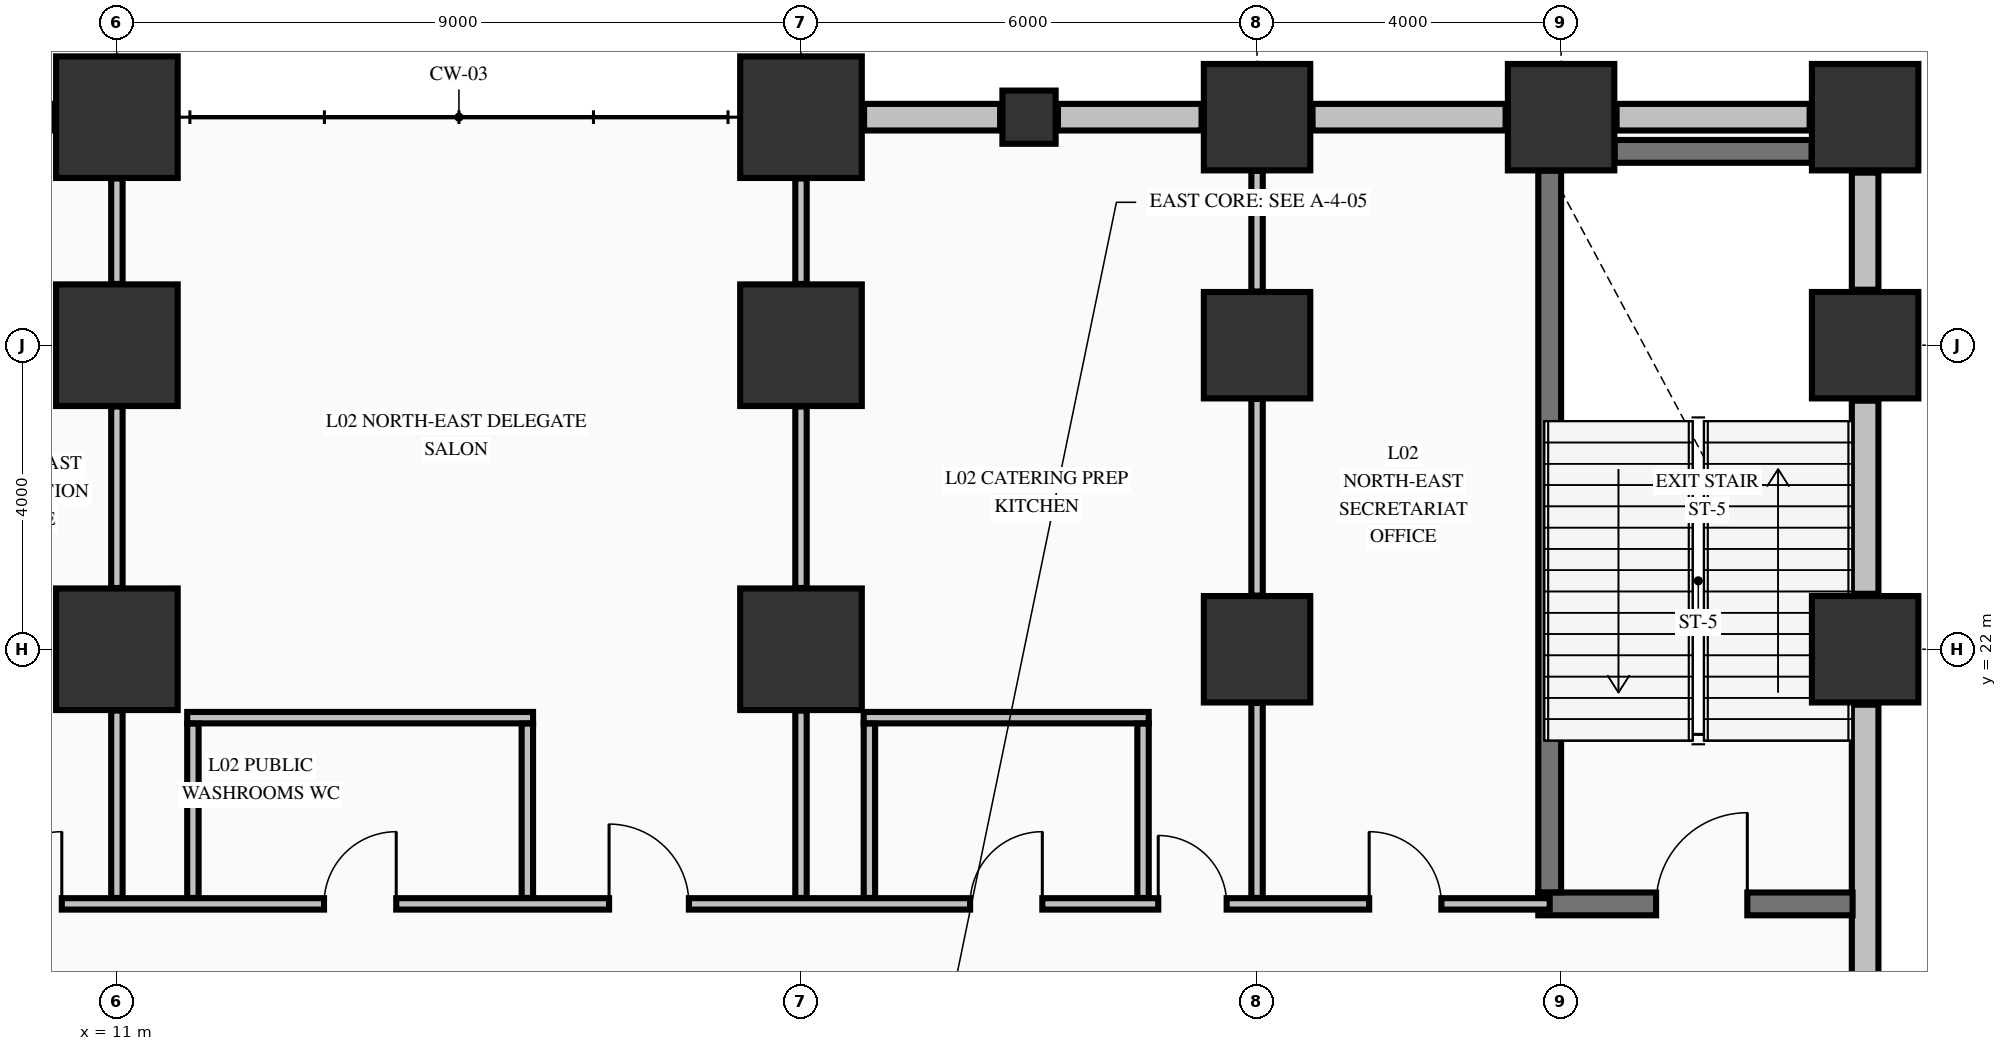
"""IFC4 building model, lengths in metres.
Left out: names, types, materials, properties, quantities, classifications, styles, units other than length and angle.
Written with IfcOpenShell. Run it as: python <this file> out.ifc"""

import sys

from ifc_helpers import new_model, si_unit, direction, frame, frame_2d, origin, origin_2d, place, context, subcontext, project, spatial, rectangle, extrude, element, fill, save


model = new_model("IFC4")
c1 = context("Model", 3, precision=1e-05, world=origin(), true_north=direction((0.0, 1.0)))
c2 = subcontext(c1, "Body", "Model", "MODEL_VIEW")
j1 = project(units=[si_unit("LENGTHUNIT", "METRE"), si_unit("PLANEANGLEUNIT", "RADIAN")], contexts=[c1])
p1 = place(None, origin())
s1 = spatial("IfcSite", under=j1, at=p1, CompositionType="ELEMENT")
p2 = place(p1, origin())
s2 = spatial("IfcBuilding", under=s1, at=p2, CompositionType="ELEMENT")
p3 = place(p2, frame((0.0, 0.0, 10.88)))
s3 = spatial("IfcBuildingStorey", under=s2, at=p3, CompositionType="ELEMENT", Elevation=10.88)
for number, where, z_axis, x_axis in (
    (1, (11.0, 22.0, 0.0), (0.0, 0.0, 1.0), (1.0, 0.0, 0.0)),
    (2, (11.0, 26.0, 0.0), (0.0, 0.0, 1.0), (1.0, 0.0, 0.0)),
    (3, (11.0, 29.0, 0.0), (0.0, 0.0, 1.0), (1.0, 0.0, 0.0)),
    (4, (20.0, 22.0, 0.0), (0.0, 0.0, 1.0), (1.0, 0.0, 0.0)),
    (5, (20.0, 26.0, 0.0), (0.0, 0.0, 1.0), (1.0, 0.0, 0.0)),
    (6, (20.0, 29.0, 0.0), (0.0, 0.0, 1.0), (1.0, 0.0, 0.0)),
):
    element("IfcColumn", number, at=place(p3, frame(where, z_axis=z_axis, x_axis=x_axis)), inside=s3, PredefinedType="COLUMN", context=c2, shape_type="SweptSolid", body=[
        extrude(rectangle(XDim=1.6, YDim=1.6, at=origin_2d()), origin(), (0.0, 0.0, 1.0), 5.09),
    ])
for number, where, z_axis, x_axis in (
    (7, (26.0, 22.0, 0.0), (0.0, 0.0, 1.0), (1.0, 0.0, 0.0)),
    (8, (26.0, 26.0, 0.0), (0.0, 0.0, 1.0), (1.0, 0.0, 0.0)),
    (9, (26.0, 29.0, 0.0), (0.0, 0.0, 1.0), (1.0, 0.0, 0.0)),
    (10, (30.0, 29.0, 0.0), (0.0, 0.0, 1.0), (1.0, 0.0, 0.0)),
    (11, (34.0, 22.0, 0.0), (0.0, 0.0, 1.0), (1.0, 0.0, 0.0)),
    (12, (34.0, 26.0, 0.0), (0.0, 0.0, 1.0), (1.0, 0.0, 0.0)),
    (13, (34.0, 29.0, 0.0), (0.0, 0.0, 1.0), (1.0, 0.0, 0.0)),
):
    element("IfcColumn", number, at=place(p3, frame(where, z_axis=z_axis, x_axis=x_axis)), inside=s3, PredefinedType="COLUMN", context=c2, shape_type="SweptSolid", body=[
        extrude(rectangle(XDim=1.4, YDim=1.4, at=origin_2d()), origin(), (0.0, 0.0, 1.0), 5.09),
    ])
p4 = place(p3, frame((23.0, 29.0, 0.0), z_axis=(0.0, 0.0, 1.0), x_axis=(1.0, 0.0, 0.0)))
e14 = element("IfcColumn", 14, at=p4, inside=s3, PredefinedType="PILASTER", context=c2, shape_type="SweptSolid", body=[
    extrude(rectangle(XDim=0.7, YDim=0.7, at=origin_2d()), origin(), (0.0, 0.0, 1.0), 5.09),
])
p5 = place(p3, frame((10.17, 29.0, 0.0), z_axis=(0.0, 0.0, 1.0), x_axis=(-1.0, 0.0, 0.0)))
e15 = element("IfcWall", 15, at=p5, inside=s3, PredefinedType="STANDARD", context=c2, shape_type="SweptSolid", body=[
    extrude(rectangle(XDim=0.94, YDim=0.35, at=frame_2d((0.47, 0.0))), origin(), (0.0, 0.0, 1.0), 4.482),
])
p6 = place(p3, frame((22.62, 29.0, 0.0), z_axis=(0.0, 0.0, 1.0), x_axis=(-1.0, 0.0, 0.0)))
e16 = element("IfcWall", 16, at=p6, inside=s3, PredefinedType="STANDARD", context=c2, shape_type="SweptSolid", body=[
    extrude(rectangle(XDim=1.79, YDim=0.35, at=frame_2d((0.895, 0.0))), origin(), (0.0, 0.0, 1.0), 4.482),
])
p7 = place(p3, frame((25.27, 29.0, 0.0), z_axis=(0.0, 0.0, 1.0), x_axis=(-1.0, 0.0, 0.0)))
e17 = element("IfcWall", 17, at=p7, inside=s3, PredefinedType="STANDARD", context=c2, shape_type="SweptSolid", body=[
    extrude(rectangle(XDim=1.89, YDim=0.35, at=frame_2d((0.945, 0.0))), origin(), (0.0, 0.0, 1.0), 4.482),
])
for number, where, z_axis, x_axis in (
    (18, (29.27, 29.0, 0.0), (0.0, 0.0, 1.0), (-1.0, 0.0, 0.0)),
    (19, (33.27, 29.0, 0.0), (0.0, 0.0, 1.0), (-1.0, 0.0, 0.0)),
):
    element("IfcWall", number, at=place(p3, frame(where, z_axis=z_axis, x_axis=x_axis)), inside=s3, PredefinedType="STANDARD", context=c2, shape_type="SweptSolid", body=[
        extrude(rectangle(XDim=2.54, YDim=0.35, at=frame_2d((1.27, 0.0))), origin(), (0.0, 0.0, 1.0), 4.482),
    ])
p8 = place(p3, frame((34.0, 21.27, 0.0), z_axis=(0.0, 0.0, 1.0), x_axis=(0.0, -1.0, 0.0)))
e20 = element("IfcWall", 20, at=p8, inside=s3, PredefinedType="STANDARD", context=c2, shape_type="SweptSolid", body=[
    extrude(rectangle(XDim=4.54, YDim=0.35, at=frame_2d((2.27, 0.0))), origin(), (0.0, 0.0, 1.0), 5.09),
])
p9 = place(p3, frame((34.0, 25.27, 0.0), z_axis=(0.0, 0.0, 1.0), x_axis=(0.0, -1.0, 0.0)))
e21 = element("IfcWall", 21, at=p9, inside=s3, PredefinedType="STANDARD", context=c2, shape_type="SweptSolid", body=[
    extrude(rectangle(XDim=2.54, YDim=0.35, at=frame_2d((1.27, 0.0))), origin(), (0.0, 0.0, 1.0), 5.09),
])
p10 = place(p3, frame((34.0, 28.27, 0.0), z_axis=(0.0, 0.0, 1.0), x_axis=(0.0, -1.0, 0.0)))
e22 = element("IfcWall", 22, at=p10, inside=s3, PredefinedType="STANDARD", context=c2, shape_type="SweptSolid", body=[
    extrude(rectangle(XDim=1.54, YDim=0.35, at=frame_2d((0.77, 0.0))), origin(), (0.0, 0.0, 1.0), 5.09),
])
p11 = place(p3, frame((29.7, 18.65, 0.0), z_axis=(0.0, 0.0, 1.0), x_axis=(1.0, 0.0, 0.0)))
e23 = element("IfcWall", 23, at=p11, inside=s3, PredefinedType="SHEAR", context=c2, shape_type="SweptSolid", body=[
    extrude(rectangle(XDim=4.135, YDim=0.3, at=frame_2d((2.067, 0.0))), origin(), (0.0, 0.0, 1.0), 5.09),
])
p12 = place(p11, frame((1.55, 0.0, 0.0)))
e24 = element("IfcOpeningElement", 24, at=p12, cuts=e23, PredefinedType="OPENING", context=c2, shape_type="SweptSolid", body=[
    extrude(rectangle(XDim=1.2, YDim=2.15, at=frame_2d((0.6, 1.075))), frame((0.0, 0.16, 0.0), z_axis=(0.0, -1.0, 0.0), x_axis=(1.0, 0.0, 0.0)), (0.0, 0.0, 1.0), 0.32),
])
p13 = place(p3, frame((30.704, 28.55, 0.0), z_axis=(0.0, 0.0, 1.0), x_axis=(1.0, 0.0, 0.0)))
e25 = element("IfcWall", 25, at=p13, inside=s3, PredefinedType="SHEAR", context=c2, shape_type="SweptSolid", body=[
    extrude(rectangle(XDim=2.592, YDim=0.3, at=frame_2d((1.296, 0.0))), origin(), (0.0, 0.0, 1.0), 5.09),
])
p14 = place(p3, frame((-33.835, 18.65, 0.0), z_axis=(0.0, 0.0, 1.0), x_axis=(1.0, 0.0, 0.0)))
e26 = element("IfcWall", 26, at=p14, inside=s3, PredefinedType="PARTITIONING", context=c2, shape_type="SweptSolid", body=[
    extrude(rectangle(XDim=63.685, YDim=0.15, at=frame_2d((31.843, 0.0))), origin(), (0.0, 0.0, 1.0), 5.09),
])
p15 = place(p14, frame((1.285, 0.0, 0.0)))
e27 = element("IfcOpeningElement", 27, at=p15, cuts=e26, PredefinedType="OPENING", context=c2, shape_type="SweptSolid", body=[
    extrude(rectangle(XDim=1.1, YDim=2.15, at=frame_2d((0.55, 1.075))), frame((0.0, 0.085, 0.0), z_axis=(0.0, -1.0, 0.0), x_axis=(1.0, 0.0, 0.0)), (0.0, 0.0, 1.0), 0.17),
])
p16 = place(p14, frame((5.285, 0.0, 0.0)))
e28 = element("IfcOpeningElement", 28, at=p16, cuts=e26, PredefinedType="OPENING", context=c2, shape_type="SweptSolid", body=[
    extrude(rectangle(XDim=1.1, YDim=2.15, at=frame_2d((0.55, 1.075))), frame((0.0, 0.085, 0.0), z_axis=(0.0, -1.0, 0.0), x_axis=(1.0, 0.0, 0.0)), (0.0, 0.0, 1.0), 0.17),
])
p17 = place(p14, frame((10.285, 0.0, 0.0)))
e29 = element("IfcOpeningElement", 29, at=p17, cuts=e26, PredefinedType="OPENING", context=c2, shape_type="SweptSolid", body=[
    extrude(rectangle(XDim=1.1, YDim=2.15, at=frame_2d((0.55, 1.075))), frame((0.0, 0.085, 0.0), z_axis=(0.0, -1.0, 0.0), x_axis=(1.0, 0.0, 0.0)), (0.0, 0.0, 1.0), 0.17),
])
p18 = place(p14, frame((15.535, 0.0, 0.0)))
e30 = element("IfcOpeningElement", 30, at=p18, cuts=e26, PredefinedType="OPENING", context=c2, shape_type="SweptSolid", body=[
    extrude(rectangle(XDim=1.1, YDim=2.15, at=frame_2d((0.55, 1.075))), frame((0.0, 0.085, 0.0), z_axis=(0.0, -1.0, 0.0), x_axis=(1.0, 0.0, 0.0)), (0.0, 0.0, 1.0), 0.17),
])
p19 = place(p14, frame((20.035, 0.0, 0.0)))
e31 = element("IfcOpeningElement", 31, at=p19, cuts=e26, PredefinedType="OPENING", context=c2, shape_type="SweptSolid", body=[
    extrude(rectangle(XDim=1.1, YDim=2.15, at=frame_2d((0.55, 1.075))), frame((0.0, 0.085, 0.0), z_axis=(0.0, -1.0, 0.0), x_axis=(1.0, 0.0, 0.0)), (0.0, 0.0, 1.0), 0.17),
])
p20 = place(p14, frame((23.56, 0.0, 0.0)))
e32 = element("IfcOpeningElement", 32, at=p20, cuts=e26, PredefinedType="OPENING", context=c2, shape_type="SweptSolid", body=[
    extrude(rectangle(XDim=0.95, YDim=2.15, at=frame_2d((0.475, 1.075))), frame((0.0, 0.085, 0.0), z_axis=(0.0, -1.0, 0.0), x_axis=(1.0, 0.0, 0.0)), (0.0, 0.0, 1.0), 0.17),
])
p21 = place(p14, frame((28.985, 0.0, 0.0)))
e33 = element("IfcOpeningElement", 33, at=p21, cuts=e26, PredefinedType="OPENING", context=c2, shape_type="SweptSolid", body=[
    extrude(rectangle(XDim=1.1, YDim=2.15, at=frame_2d((0.55, 1.075))), frame((0.0, 0.085, 0.0), z_axis=(0.0, -1.0, 0.0), x_axis=(1.0, 0.0, 0.0)), (0.0, 0.0, 1.0), 0.17),
])
p22 = place(p14, frame((37.585, 0.0, 0.0)))
e34 = element("IfcOpeningElement", 34, at=p22, cuts=e26, PredefinedType="OPENING", context=c2, shape_type="SweptSolid", body=[
    extrude(rectangle(XDim=1.1, YDim=2.15, at=frame_2d((0.55, 1.075))), frame((0.0, 0.085, 0.0), z_axis=(0.0, -1.0, 0.0), x_axis=(1.0, 0.0, 0.0)), (0.0, 0.0, 1.0), 0.17),
])
p23 = place(p14, frame((43.16, 0.0, 0.0)))
e35 = element("IfcOpeningElement", 35, at=p23, cuts=e26, PredefinedType="OPENING", context=c2, shape_type="SweptSolid", body=[
    extrude(rectangle(XDim=0.95, YDim=2.15, at=frame_2d((0.475, 1.075))), frame((0.0, 0.085, 0.0), z_axis=(0.0, -1.0, 0.0), x_axis=(1.0, 0.0, 0.0)), (0.0, 0.0, 1.0), 0.17),
])
p24 = place(p14, frame((61.31, 0.0, 0.0)))
e36 = element("IfcOpeningElement", 36, at=p24, cuts=e26, PredefinedType="OPENING", context=c2, shape_type="SweptSolid", body=[
    extrude(rectangle(XDim=0.95, YDim=2.15, at=frame_2d((0.475, 1.075))), frame((0.0, 0.085, 0.0), z_axis=(0.0, -1.0, 0.0), x_axis=(1.0, 0.0, 0.0)), (0.0, 0.0, 1.0), 0.17),
])
p25 = place(p14, frame((47.56, 0.0, 0.0)))
e37 = element("IfcOpeningElement", 37, at=p25, cuts=e26, PredefinedType="OPENING", context=c2, shape_type="SweptSolid", body=[
    extrude(rectangle(XDim=0.95, YDim=2.15, at=frame_2d((0.475, 1.075))), frame((0.0, 0.085, 0.0), z_axis=(0.0, -1.0, 0.0), x_axis=(1.0, 0.0, 0.0)), (0.0, 0.0, 1.0), 0.17),
])
p26 = place(p14, frame((51.31, 0.0, 0.0)))
e38 = element("IfcOpeningElement", 38, at=p26, cuts=e26, PredefinedType="OPENING", context=c2, shape_type="SweptSolid", body=[
    extrude(rectangle(XDim=1.05, YDim=2.15, at=frame_2d((0.525, 1.075))), frame((0.0, 0.085, 0.0), z_axis=(0.0, -1.0, 0.0), x_axis=(1.0, 0.0, 0.0)), (0.0, 0.0, 1.0), 0.17),
])
p27 = place(p14, frame((56.06, 0.0, 0.0)))
e39 = element("IfcOpeningElement", 39, at=p27, cuts=e26, PredefinedType="OPENING", context=c2, shape_type="SweptSolid", body=[
    extrude(rectangle(XDim=0.95, YDim=2.15, at=frame_2d((0.475, 1.075))), frame((0.0, 0.085, 0.0), z_axis=(0.0, -1.0, 0.0), x_axis=(1.0, 0.0, 0.0)), (0.0, 0.0, 1.0), 0.17),
])
p28 = place(p14, frame((58.535, 0.0, 0.0)))
e40 = element("IfcOpeningElement", 40, at=p28, cuts=e26, PredefinedType="OPENING", context=c2, shape_type="SweptSolid", body=[
    extrude(rectangle(XDim=0.9, YDim=2.15, at=frame_2d((0.45, 1.075))), frame((0.0, 0.085, 0.0), z_axis=(0.0, -1.0, 0.0), x_axis=(1.0, 0.0, 0.0)), (0.0, 0.0, 1.0), 0.17),
])
p29 = place(p3, frame((11.925, 21.1, 0.0), z_axis=(0.0, 0.0, 1.0), x_axis=(1.0, 0.0, 0.0)))
e41 = element("IfcWall", 41, at=p29, inside=s3, PredefinedType="PARTITIONING", context=c2, shape_type="SweptSolid", body=[
    extrude(rectangle(XDim=4.55, YDim=0.15, at=frame_2d((2.275, 0.0))), origin(), (0.0, 0.0, 1.0), 5.09),
])
p30 = place(p3, frame((20.825, 21.1, 0.0), z_axis=(0.0, 0.0, 1.0), x_axis=(1.0, 0.0, 0.0)))
e42 = element("IfcWall", 42, at=p30, inside=s3, PredefinedType="PARTITIONING", context=c2, shape_type="SweptSolid", body=[
    extrude(rectangle(XDim=3.75, YDim=0.15, at=frame_2d((1.875, 0.0))), origin(), (0.0, 0.0, 1.0), 5.09),
])
p31 = place(p3, frame((29.85, 18.802, 0.0), z_axis=(0.0, 0.0, 1.0), x_axis=(0.0, 1.0, 0.0)))
e43 = element("IfcWall", 43, at=p31, inside=s3, PredefinedType="SHEAR", context=c2, shape_type="SweptSolid", body=[
    extrude(rectangle(XDim=9.494, YDim=0.3, at=frame_2d((4.747, 0.0))), origin(), (0.0, 0.0, 1.0), 5.09),
])
p32 = place(p3, frame((11.0, 18.728, 0.0), z_axis=(0.0, 0.0, 1.0), x_axis=(0.0, 1.0, 0.0)))
e44 = element("IfcWall", 44, at=p32, inside=s3, PredefinedType="PARTITIONING", context=c2, shape_type="SweptSolid", body=[
    extrude(rectangle(XDim=2.466, YDim=0.15, at=frame_2d((1.233, 0.0))), origin(), (0.0, 0.0, 1.0), 4.132),
])
p33 = place(p3, frame((11.0, 22.806, 0.0), z_axis=(0.0, 0.0, 1.0), x_axis=(0.0, 1.0, 0.0)))
e45 = element("IfcWall", 45, at=p33, inside=s3, PredefinedType="PARTITIONING", context=c2, shape_type="SweptSolid", body=[
    extrude(rectangle(XDim=2.388, YDim=0.15, at=frame_2d((1.194, 0.0))), origin(), (0.0, 0.0, 1.0), 4.132),
])
p34 = place(p3, frame((11.0, 26.806, 0.0), z_axis=(0.0, 0.0, 1.0), x_axis=(0.0, 1.0, 0.0)))
e46 = element("IfcWall", 46, at=p34, inside=s3, PredefinedType="PARTITIONING", context=c2, shape_type="SweptSolid", body=[
    extrude(rectangle(XDim=1.388, YDim=0.15, at=frame_2d((0.694, 0.0))), origin(), (0.0, 0.0, 1.0), 4.132),
])
for number, where, z_axis, x_axis in (
    (47, (12.0, 18.728, 0.0), (0.0, 0.0, 1.0), (0.0, 1.0, 0.0)),
    (48, (16.4, 18.728, 0.0), (0.0, 0.0, 1.0), (0.0, 1.0, 0.0)),
):
    element("IfcWall", number, at=place(p3, frame(where, z_axis=z_axis, x_axis=x_axis)), inside=s3, PredefinedType="PARTITIONING", context=c2, shape_type="SweptSolid", body=[
        extrude(rectangle(XDim=2.294, YDim=0.15, at=frame_2d((1.147, 0.0))), origin(), (0.0, 0.0, 1.0), 5.09),
    ])
p35 = place(p3, frame((20.0, 18.728, 0.0), z_axis=(0.0, 0.0, 1.0), x_axis=(0.0, 1.0, 0.0)))
e49 = element("IfcWall", 49, at=p35, inside=s3, PredefinedType="PARTITIONING", context=c2, shape_type="SweptSolid", body=[
    extrude(rectangle(XDim=2.466, YDim=0.15, at=frame_2d((1.233, 0.0))), origin(), (0.0, 0.0, 1.0), 4.132),
])
p36 = place(p3, frame((20.0, 22.806, 0.0), z_axis=(0.0, 0.0, 1.0), x_axis=(0.0, 1.0, 0.0)))
e50 = element("IfcWall", 50, at=p36, inside=s3, PredefinedType="PARTITIONING", context=c2, shape_type="SweptSolid", body=[
    extrude(rectangle(XDim=2.388, YDim=0.15, at=frame_2d((1.194, 0.0))), origin(), (0.0, 0.0, 1.0), 4.132),
])
p37 = place(p3, frame((20.0, 26.806, 0.0), z_axis=(0.0, 0.0, 1.0), x_axis=(0.0, 1.0, 0.0)))
e51 = element("IfcWall", 51, at=p37, inside=s3, PredefinedType="PARTITIONING", context=c2, shape_type="SweptSolid", body=[
    extrude(rectangle(XDim=1.388, YDim=0.15, at=frame_2d((0.694, 0.0))), origin(), (0.0, 0.0, 1.0), 4.132),
])
for number, where, z_axis, x_axis in (
    (52, (20.9, 18.728, 0.0), (0.0, 0.0, 1.0), (0.0, 1.0, 0.0)),
    (53, (24.5, 18.728, 0.0), (0.0, 0.0, 1.0), (0.0, 1.0, 0.0)),
):
    element("IfcWall", number, at=place(p3, frame(where, z_axis=z_axis, x_axis=x_axis)), inside=s3, PredefinedType="PARTITIONING", context=c2, shape_type="SweptSolid", body=[
        extrude(rectangle(XDim=2.294, YDim=0.15, at=frame_2d((1.147, 0.0))), origin(), (0.0, 0.0, 1.0), 5.09),
    ])
p38 = place(p3, frame((26.0, 18.728, 0.0), z_axis=(0.0, 0.0, 1.0), x_axis=(0.0, 1.0, 0.0)))
e54 = element("IfcWall", 54, at=p38, inside=s3, PredefinedType="PARTITIONING", context=c2, shape_type="SweptSolid", body=[
    extrude(rectangle(XDim=2.566, YDim=0.15, at=frame_2d((1.283, 0.0))), origin(), (0.0, 0.0, 1.0), 4.132),
])
p39 = place(p3, frame((26.0, 22.706, 0.0), z_axis=(0.0, 0.0, 1.0), x_axis=(0.0, 1.0, 0.0)))
e55 = element("IfcWall", 55, at=p39, inside=s3, PredefinedType="PARTITIONING", context=c2, shape_type="SweptSolid", body=[
    extrude(rectangle(XDim=2.588, YDim=0.15, at=frame_2d((1.294, 0.0))), origin(), (0.0, 0.0, 1.0), 4.132),
])
p40 = place(p3, frame((26.0, 26.706, 0.0), z_axis=(0.0, 0.0, 1.0), x_axis=(0.0, 1.0, 0.0)))
e56 = element("IfcWall", 56, at=p40, inside=s3, PredefinedType="PARTITIONING", context=c2, shape_type="SweptSolid", body=[
    extrude(rectangle(XDim=1.588, YDim=0.15, at=frame_2d((0.794, 0.0))), origin(), (0.0, 0.0, 1.0), 4.132),
])
p41 = place(p12, origin())
e57 = element("IfcDoor", 57, at=p41, inside=s3, OperationType="SINGLE_SWING_RIGHT", PredefinedType="DOOR", context=c2, shape_type="SweptSolid", body=[
    extrude(rectangle(XDim=1.2, YDim=2.15, at=frame_2d((0.6, 1.075))), frame((0.0, 0.025, 0.0), z_axis=(0.0, -1.0, 0.0), x_axis=(1.0, 0.0, 0.0)), (0.0, 0.0, 1.0), 0.05),
])
fill(e24, e57)
p42 = place(p23, origin())
e58 = element("IfcDoor", 58, at=p42, inside=s3, OperationType="SINGLE_SWING_RIGHT", PredefinedType="DOOR", context=c2, shape_type="SweptSolid", body=[
    extrude(rectangle(XDim=0.95, YDim=2.15, at=frame_2d((0.475, 1.075))), frame((0.0, 0.025, 0.0), z_axis=(0.0, -1.0, 0.0), x_axis=(1.0, 0.0, 0.0)), (0.0, 0.0, 1.0), 0.05),
])
fill(e35, e58)
p43 = place(p24, origin())
e59 = element("IfcDoor", 59, at=p43, inside=s3, OperationType="SINGLE_SWING_LEFT", PredefinedType="DOOR", context=c2, shape_type="SweptSolid", body=[
    extrude(rectangle(XDim=0.95, YDim=2.15, at=frame_2d((0.475, 1.075))), frame((0.0, 0.025, 0.0), z_axis=(0.0, -1.0, 0.0), x_axis=(1.0, 0.0, 0.0)), (0.0, 0.0, 1.0), 0.05),
])
fill(e36, e59)
p44 = place(p25, origin())
e60 = element("IfcDoor", 60, at=p44, inside=s3, OperationType="SINGLE_SWING_RIGHT", PredefinedType="DOOR", context=c2, shape_type="SweptSolid", body=[
    extrude(rectangle(XDim=0.95, YDim=2.15, at=frame_2d((0.475, 1.075))), frame((0.0, 0.025, 0.0), z_axis=(0.0, -1.0, 0.0), x_axis=(1.0, 0.0, 0.0)), (0.0, 0.0, 1.0), 0.05),
])
fill(e37, e60)
p45 = place(p26, origin())
e61 = element("IfcDoor", 61, at=p45, inside=s3, OperationType="SINGLE_SWING_LEFT", PredefinedType="DOOR", context=c2, shape_type="SweptSolid", body=[
    extrude(rectangle(XDim=1.05, YDim=2.15, at=frame_2d((0.525, 1.075))), frame((0.0, 0.025, 0.0), z_axis=(0.0, -1.0, 0.0), x_axis=(1.0, 0.0, 0.0)), (0.0, 0.0, 1.0), 0.05),
])
fill(e38, e61)
p46 = place(p27, origin())
e62 = element("IfcDoor", 62, at=p46, inside=s3, OperationType="SINGLE_SWING_RIGHT", PredefinedType="DOOR", context=c2, shape_type="SweptSolid", body=[
    extrude(rectangle(XDim=0.95, YDim=2.15, at=frame_2d((0.475, 1.075))), frame((0.0, 0.025, 0.0), z_axis=(0.0, -1.0, 0.0), x_axis=(1.0, 0.0, 0.0)), (0.0, 0.0, 1.0), 0.05),
])
fill(e39, e62)
p47 = place(p28, origin())
e63 = element("IfcDoor", 63, at=p47, inside=s3, OperationType="SINGLE_SWING_LEFT", PredefinedType="DOOR", context=c2, shape_type="SweptSolid", body=[
    extrude(rectangle(XDim=0.9, YDim=2.15, at=frame_2d((0.45, 1.075))), frame((0.0, 0.025, 0.0), z_axis=(0.0, -1.0, 0.0), x_axis=(1.0, 0.0, 0.0)), (0.0, 0.0, 1.0), 0.05),
])
fill(e40, e63)
save(model, sys.argv[1])
